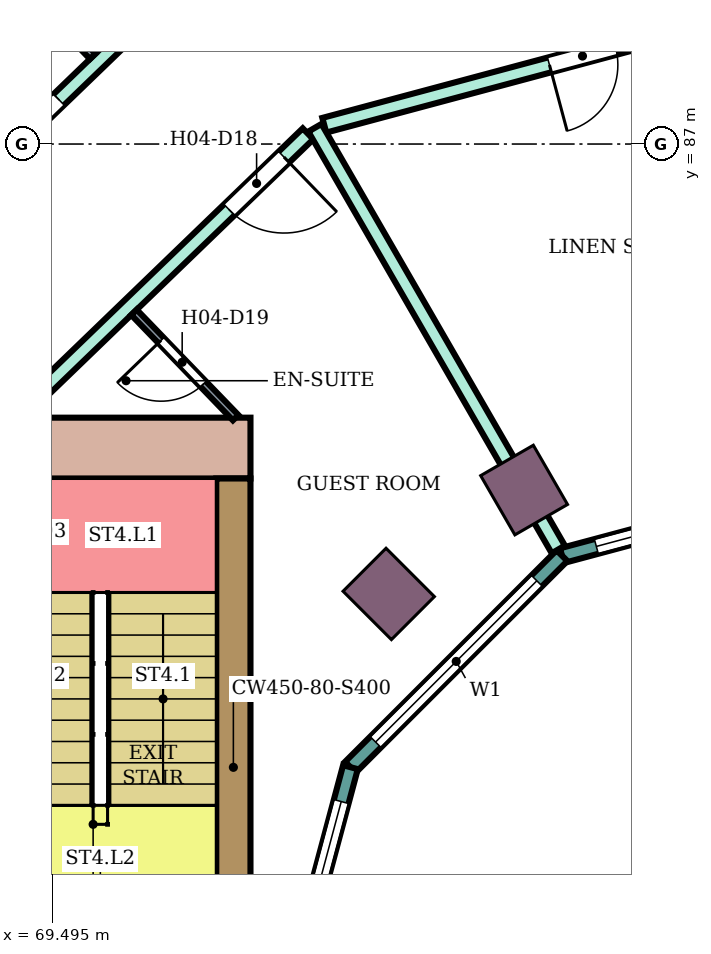
"""IFC4 building model, lengths in metres.
Left out: names, types, materials, properties, quantities, classifications, styles, units other than length and angle.
Written with IfcOpenShell. Run it as: python <this file> out.ifc"""

import sys

from ifc_helpers import new_model, si_unit, direction, frame, frame_2d, origin, origin_2d, place, context, subcontext, project, spatial, rectangle, extrude, element, fill, save


model = new_model("IFC4")
c1 = context("Model", 3, precision=1e-05, world=origin(), true_north=direction((0.0, 1.0)))
c2 = subcontext(c1, "Body", "Model", "MODEL_VIEW")
j1 = project(units=[si_unit("LENGTHUNIT", "METRE"), si_unit("PLANEANGLEUNIT", "RADIAN")], contexts=[c1])
p1 = place(None, origin())
s1 = spatial("IfcSite", under=j1, at=p1, CompositionType="ELEMENT")
p2 = place(p1, origin())
s2 = spatial("IfcBuilding", under=s1, at=p2, CompositionType="ELEMENT")
p3 = place(p2, frame((0.0, 0.0, 70.6)))
s3 = spatial("IfcBuildingStorey", under=s2, at=p3, CompositionType="ELEMENT", Elevation=70.6)
for number, where, z_axis, x_axis in (
    (1, (75.7, 82.448, 0.0), (0.0, 0.0, 1.0), (-0.5, 0.866, 0.0)),
    (2, (73.919, 81.081, 0.0), (0.0, 0.0, 1.0), (-0.707, 0.707, 0.0)),
):
    element("IfcColumn", number, at=place(p3, frame(where, z_axis=z_axis, x_axis=x_axis)), inside=s3, PredefinedType="COLUMN", context=c2, shape_type="SweptSolid", body=[
        extrude(rectangle(XDim=0.9, YDim=0.8, at=origin_2d()), origin(), (0.0, 0.0, 1.0), 3.8),
    ])
p4 = place(p3, frame((72.1, 83.0, 0.0), z_axis=(0.0, 0.0, 1.0), x_axis=(-1.0, 0.0, 0.0)))
e3 = element("IfcWall", 3, at=p4, inside=s3, PredefinedType="SHEAR", context=c2, shape_type="SweptSolid", body=[
    extrude(rectangle(XDim=14.7, YDim=0.8, at=frame_2d((7.35, 0.0))), origin(), (0.0, 0.0, 1.0), 3.4),
])
p5 = place(p4, frame((4.2, 0.0, 0.0)))
e4 = element("IfcOpeningElement", 4, at=p5, cuts=e3, PredefinedType="OPENING", context=c2, shape_type="SweptSolid", body=[
    extrude(rectangle(XDim=2.4, YDim=2.4, at=frame_2d((1.2, 1.2))), frame((0.0, 0.41, 0.0), z_axis=(0.0, -1.0, 0.0), x_axis=(1.0, 0.0, 0.0)), (0.0, 0.0, 1.0), 0.82),
])
p6 = place(p3, frame((71.875, 82.6, 0.0), z_axis=(0.0, 0.0, 1.0), x_axis=(0.0, -1.0, 0.0)))
e5 = element("IfcWall", 5, at=p6, inside=s3, PredefinedType="SHEAR", context=c2, shape_type="SweptSolid", body=[
    extrude(rectangle(XDim=7.6, YDim=0.45, at=frame_2d((3.8, 0.0))), origin(), (0.0, 0.0, 1.0), 3.4),
])
p7 = place(p3, frame((80.0, 82.604, 0.0), z_axis=(0.0, 0.0, 1.0), x_axis=(-0.965933654434, -0.258789828301, 0.0)))
e6 = element("IfcWall", 6, at=p7, inside=s3, PredefinedType="NOTDEFINED", context=c2, shape_type="SweptSolid", body=[
    extrude(rectangle(XDim=3.936, YDim=0.2, at=frame_2d((1.968, 0.0))), origin(), (0.0, 0.0, 1.0), 3.8),
])
p8 = place(p7, frame((0.468, 0.0, 0.9)))
e7 = element("IfcOpeningElement", 7, at=p8, cuts=e6, PredefinedType="OPENING", context=c2, shape_type="SweptSolid", body=[
    extrude(rectangle(XDim=3.0, YDim=2.3, at=frame_2d((1.5, 1.15))), frame((0.0, 0.11, 0.0), z_axis=(0.0, -1.0, 0.0), x_axis=(1.0, 0.0, 0.0)), (0.0, 0.0, 1.0), 0.22),
])
p9 = place(p3, frame((76.198, 81.585, 0.0), z_axis=(0.0, 0.0, 1.0), x_axis=(-0.707106781187, -0.707106781187, 0.0)))
e8 = element("IfcWall", 8, at=p9, inside=s3, PredefinedType="NOTDEFINED", context=c2, shape_type="SweptSolid", body=[
    extrude(rectangle(XDim=3.936, YDim=0.2, at=frame_2d((1.968, 0.0))), origin(), (0.0, 0.0, 1.0), 3.8),
])
p10 = place(p9, frame((0.468, 0.0, 0.9)))
e9 = element("IfcOpeningElement", 9, at=p10, cuts=e8, PredefinedType="OPENING", context=c2, shape_type="SweptSolid", body=[
    extrude(rectangle(XDim=3.0, YDim=2.3, at=frame_2d((1.5, 1.15))), frame((0.0, 0.11, 0.0), z_axis=(0.0, -1.0, 0.0), x_axis=(1.0, 0.0, 0.0)), (0.0, 0.0, 1.0), 0.22),
])
p11 = place(p3, frame((73.415, 78.802, 0.0), z_axis=(0.0, 0.0, 1.0), x_axis=(-0.258789828301, -0.965933654434, 0.0)))
e10 = element("IfcWall", 10, at=p11, inside=s3, PredefinedType="NOTDEFINED", context=c2, shape_type="SweptSolid", body=[
    extrude(rectangle(XDim=3.936, YDim=0.2, at=frame_2d((1.968, 0.0))), origin(), (0.0, 0.0, 1.0), 3.8),
])
p12 = place(p11, frame((0.468, 0.0, 0.9)))
e11 = element("IfcOpeningElement", 11, at=p12, cuts=e10, PredefinedType="OPENING", context=c2, shape_type="SweptSolid", body=[
    extrude(rectangle(XDim=3.0, YDim=2.3, at=frame_2d((1.5, 1.15))), frame((0.0, 0.11, 0.0), z_axis=(0.0, -1.0, 0.0), x_axis=(1.0, 0.0, 0.0)), (0.0, 0.0, 1.0), 0.22),
])
p13 = place(p3, frame((66.797, 84.9, 0.0), z_axis=(0.0, 0.0, 1.0), x_axis=(0.719692092412, 0.694293376116, 0.0)))
e12 = element("IfcWall", 12, at=p13, inside=s3, PredefinedType="PARTITIONING", context=c2, shape_type="SweptSolid", body=[
    extrude(rectangle(XDim=6.584, YDim=0.2, at=frame_2d((3.292, 0.0))), origin(), (0.0, 0.0, 1.0), 3.35),
])
p14 = place(p13, frame((2.866, 0.0, 0.0)))
e13 = element("IfcOpeningElement", 13, at=p14, cuts=e12, PredefinedType="OPENING", context=c2, shape_type="SweptSolid", body=[
    extrude(rectangle(XDim=1.0, YDim=2.1, at=frame_2d((0.5, 1.05))), frame((0.0, 0.11, 0.0), z_axis=(0.0, -1.0, 0.0), x_axis=(1.0, 0.0, 0.0)), (0.0, 0.0, 1.0), 0.22),
])
p15 = place(p3, frame((68.987, 83.4, 0.0), z_axis=(0.0, 0.0, 1.0), x_axis=(0.719591503389, 0.694397629784, 0.0)))
e14 = element("IfcWall", 14, at=p15, inside=s3, PredefinedType="PARTITIONING", context=c2, shape_type="SweptSolid", body=[
    extrude(rectangle(XDim=5.378, YDim=0.2, at=frame_2d((2.689, 0.0))), origin(), (0.0, 0.0, 1.0), 3.35),
])
p16 = place(p15, frame((3.938, 0.0, 0.0)))
e15 = element("IfcOpeningElement", 15, at=p16, cuts=e14, PredefinedType="OPENING", context=c2, shape_type="SweptSolid", body=[
    extrude(rectangle(XDim=1.0, YDim=2.1, at=frame_2d((0.5, 1.05))), frame((0.0, 0.11, 0.0), z_axis=(0.0, -1.0, 0.0), x_axis=(1.0, 0.0, 0.0)), (0.0, 0.0, 1.0), 0.22),
])
p17 = place(p3, frame((73.071, 87.247, 0.0), z_axis=(0.0, 0.0, 1.0), x_axis=(0.965914318977, 0.258861987157, 0.0)))
e16 = element("IfcWall", 16, at=p17, inside=s3, PredefinedType="PARTITIONING", context=c2, shape_type="SweptSolid", body=[
    extrude(rectangle(XDim=7.043, YDim=0.2, at=frame_2d((3.521, 0.0))), origin(), (0.0, 0.0, 1.0), 3.35),
])
p18 = place(p17, frame((3.067, 0.0, 0.0)))
e17 = element("IfcOpeningElement", 17, at=p18, cuts=e16, PredefinedType="OPENING", context=c2, shape_type="SweptSolid", body=[
    extrude(rectangle(XDim=0.9, YDim=2.1, at=frame_2d((0.45, 1.05))), frame((0.0, 0.11, 0.0), z_axis=(0.0, -1.0, 0.0), x_axis=(1.0, 0.0, 0.0)), (0.0, 0.0, 1.0), 0.22),
])
p19 = place(p3, frame((72.948, 87.214, 0.0), z_axis=(0.0, 0.0, 1.0), x_axis=(0.499927021214, -0.866067534006, 0.0)))
e18 = element("IfcWall", 18, at=p19, inside=s3, PredefinedType="PARTITIONING", context=c2, shape_type="SweptSolid", body=[
    extrude(rectangle(XDim=6.405, YDim=0.2, at=frame_2d((3.203, 0.0))), origin(), (0.0, 0.0, 1.0), 3.35),
])
p20 = place(p3, frame((68.185, 90.06, 0.0), z_axis=(0.0, 0.0, 1.0), x_axis=(0.69446127412, -0.719530081892, 0.0)))
e19 = element("IfcWall", 19, at=p20, inside=s3, PredefinedType="PARTITIONING", context=c2, shape_type="SweptSolid", body=[
    extrude(rectangle(XDim=2.649, YDim=0.1, at=frame_2d((1.324, 0.0))), origin(), (0.0, 0.0, 1.0), 3.35),
])
p21 = place(p20, frame((0.95, 0.0, 0.0)))
e20 = element("IfcOpeningElement", 20, at=p21, cuts=e19, PredefinedType="OPENING", context=c2, shape_type="SweptSolid", body=[
    extrude(rectangle(XDim=0.8, YDim=2.1, at=frame_2d((0.4, 1.05))), frame((0.0, 0.06, 0.0), z_axis=(0.0, -1.0, 0.0), x_axis=(1.0, 0.0, 0.0)), (0.0, 0.0, 1.0), 0.12),
])
p22 = place(p3, frame((70.567, 84.786, 0.0), z_axis=(0.0, 0.0, 1.0), x_axis=(0.694447472534, -0.719543402368, 0.0)))
e21 = element("IfcWall", 21, at=p22, inside=s3, PredefinedType="PARTITIONING", context=c2, shape_type="SweptSolid", body=[
    extrude(rectangle(XDim=1.926, YDim=0.1, at=frame_2d((0.963, 0.0))), origin(), (0.0, 0.0, 1.0), 3.35),
])
p23 = place(p22, frame((0.513, 0.0, 0.0)))
e22 = element("IfcOpeningElement", 22, at=p23, cuts=e21, PredefinedType="OPENING", context=c2, shape_type="SweptSolid", body=[
    extrude(rectangle(XDim=0.8, YDim=2.1, at=frame_2d((0.4, 1.05))), frame((0.0, 0.06, 0.0), z_axis=(0.0, -1.0, 0.0), x_axis=(1.0, 0.0, 0.0)), (0.0, 0.0, 1.0), 0.12),
])
p24 = place(p8, origin())
e23 = element("IfcWindow", 23, at=p24, inside=s3, PartitioningType="SINGLE_PANEL", PredefinedType="WINDOW", context=c2, shape_type="SweptSolid", body=[
    extrude(rectangle(XDim=3.0, YDim=2.3, at=frame_2d((1.5, 1.15))), frame((0.0, 0.03, 0.0), z_axis=(0.0, -1.0, 0.0), x_axis=(1.0, 0.0, 0.0)), (0.0, 0.0, 1.0), 0.06),
])
fill(e7, e23)
p25 = place(p10, origin())
e24 = element("IfcWindow", 24, at=p25, inside=s3, PartitioningType="SINGLE_PANEL", PredefinedType="WINDOW", context=c2, shape_type="SweptSolid", body=[
    extrude(rectangle(XDim=3.0, YDim=2.3, at=frame_2d((1.5, 1.15))), frame((0.0, 0.03, 0.0), z_axis=(0.0, -1.0, 0.0), x_axis=(1.0, 0.0, 0.0)), (0.0, 0.0, 1.0), 0.06),
])
fill(e9, e24)
p26 = place(p12, origin())
e25 = element("IfcWindow", 25, at=p26, inside=s3, PartitioningType="SINGLE_PANEL", PredefinedType="WINDOW", context=c2, shape_type="SweptSolid", body=[
    extrude(rectangle(XDim=3.0, YDim=2.3, at=frame_2d((1.5, 1.15))), frame((0.0, 0.03, 0.0), z_axis=(0.0, -1.0, 0.0), x_axis=(1.0, 0.0, 0.0)), (0.0, 0.0, 1.0), 0.06),
])
fill(e11, e25)
p27 = place(p14, origin())
e26 = element("IfcDoor", 26, at=p27, inside=s3, OperationType="SINGLE_SWING_LEFT", PredefinedType="DOOR", context=c2, shape_type="SweptSolid", body=[
    extrude(rectangle(XDim=1.0, YDim=2.1, at=frame_2d((0.5, 1.05))), frame((0.0, 0.025, 0.0), z_axis=(0.0, -1.0, 0.0), x_axis=(1.0, 0.0, 0.0)), (0.0, 0.0, 1.0), 0.05),
])
fill(e13, e26)
p28 = place(p18, frame((0.9, 0.0, 0.0), z_axis=(0.0, 0.0, 1.0), x_axis=(-1.0, 0.0, 0.0)))
e27 = element("IfcDoor", 27, at=p28, inside=s3, OperationType="SINGLE_SWING_RIGHT", PredefinedType="DOOR", context=c2, shape_type="SweptSolid", body=[
    extrude(rectangle(XDim=0.9, YDim=2.1, at=frame_2d((0.45, 1.05))), frame((0.0, 0.025, 0.0), z_axis=(0.0, -1.0, 0.0), x_axis=(1.0, 0.0, 0.0)), (0.0, 0.0, 1.0), 0.05),
])
fill(e17, e27)
p29 = place(p16, frame((1.0, 0.0, 0.0), z_axis=(0.0, 0.0, 1.0), x_axis=(-1.0, 0.0, 0.0)))
e28 = element("IfcDoor", 28, at=p29, inside=s3, OperationType="SINGLE_SWING_LEFT", PredefinedType="DOOR", context=c2, shape_type="SweptSolid", body=[
    extrude(rectangle(XDim=1.0, YDim=2.1, at=frame_2d((0.5, 1.05))), frame((0.0, 0.025, 0.0), z_axis=(0.0, -1.0, 0.0), x_axis=(1.0, 0.0, 0.0)), (0.0, 0.0, 1.0), 0.05),
])
fill(e15, e28)
p30 = place(p23, frame((0.8, 0.0, 0.0), z_axis=(0.0, 0.0, 1.0), x_axis=(-1.0, 0.0, 0.0)))
e29 = element("IfcDoor", 29, at=p30, inside=s3, OperationType="SINGLE_SWING_RIGHT", PredefinedType="DOOR", context=c2, shape_type="SweptSolid", body=[
    extrude(rectangle(XDim=0.8, YDim=2.1, at=frame_2d((0.4, 1.05))), frame((0.0, 0.025, 0.0), z_axis=(0.0, -1.0, 0.0), x_axis=(1.0, 0.0, 0.0)), (0.0, 0.0, 1.0), 0.05),
])
fill(e22, e29)
save(model, sys.argv[1])
